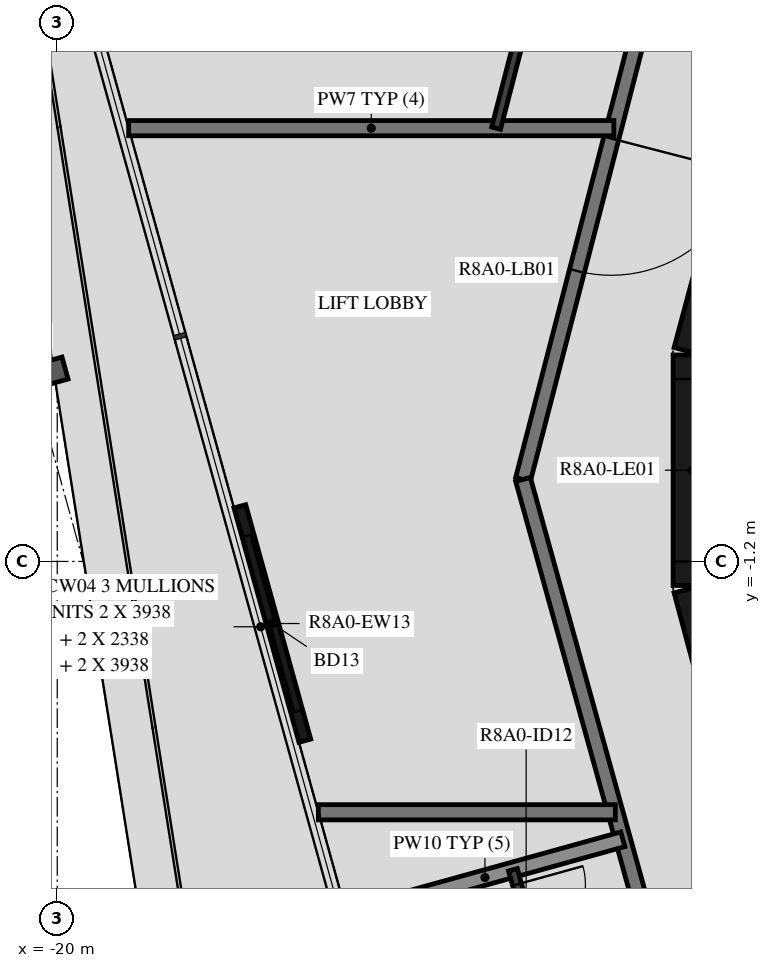
"""IFC4 building model, lengths in metres.
Left out: names, types, materials, properties, quantities, classifications, styles, units other than length and angle.
Written with IfcOpenShell. Run it as: python <this file> out.ifc"""

import sys

from ifc_helpers import new_model, si_unit, direction, frame, frame_2d, origin, origin_2d, place, context, subcontext, project, spatial, rectangle, i_section, extrude, element, fill, save


model = new_model("IFC4")
c1 = context("Model", 3, precision=1e-05, world=origin(), true_north=direction((0.0, 1.0)))
c2 = subcontext(c1, "Body", "Model", "MODEL_VIEW")
j1 = project(units=[si_unit("LENGTHUNIT", "METRE"), si_unit("PLANEANGLEUNIT", "RADIAN")], contexts=[c1])
p1 = place(None, origin())
s1 = spatial("IfcSite", under=j1, at=p1, CompositionType="ELEMENT")
p2 = place(p1, origin())
s2 = spatial("IfcBuilding", under=s1, at=p2, CompositionType="ELEMENT")
p3 = place(p2, frame((0.0, 0.0, 298.2)))
s3 = spatial("IfcBuildingStorey", under=s2, at=p3, CompositionType="ELEMENT", Elevation=298.2)
p4 = place(p3, frame((-20.331, 1.224, -0.45), z_axis=(0.0, 0.0, 1.0), x_axis=(-0.267238143562, 0.963630517691, 0.0)))
e1 = element("IfcColumn", 1, at=p4, inside=s3, PredefinedType="COLUMN", context=c2, shape_type="SweptSolid", body=[
    extrude(i_section(OverallWidth=0.3, OverallDepth=0.9, WebThickness=0.019, FlangeThickness=0.035, FilletRadius=0.03, at=origin_2d()), origin(), (0.0, 0.0, 1.0), 3.57),
])
p5 = place(p3, frame((-17.598, -0.475, 0.0), z_axis=(0.0, 0.0, 1.0), x_axis=(0.267266077957, -0.963622770369, 0.0)))
e2 = element("IfcWall", 2, at=p5, inside=s3, PredefinedType="STANDARD", context=c2, shape_type="SweptSolid", body=[
    extrude(rectangle(XDim=3.2, YDim=0.16, at=frame_2d((1.6, 0.0))), origin(), (0.0, 0.0, 1.0), 3.12),
])
p6 = place(p5, frame((0.4, 0.0, 0.0)))
e3 = element("IfcOpeningElement", 3, at=p6, cuts=e2, PredefinedType="OPENING", context=c2, shape_type="SweptSolid", body=[
    extrude(rectangle(XDim=2.4, YDim=2.4, at=frame_2d((1.2, 1.2))), frame((0.0, 0.09, 0.0), z_axis=(0.0, -1.0, 0.0), x_axis=(1.0, 0.0, 0.0)), (0.0, 0.0, 1.0), 0.18),
])
p7 = place(p3, frame((-10.858, 4.479, 0.0), z_axis=(0.0, 0.0, 1.0), x_axis=(-0.258734743916, -0.965948410781, 0.0)))
e4 = element("IfcWall", 4, at=p7, inside=s3, PredefinedType="SHEAR", context=c2, shape_type="SweptSolid", body=[
    extrude(rectangle(XDim=3.033, YDim=0.5, at=frame_2d((1.516, 0.0))), origin(), (0.0, 0.0, 1.0), 3.12),
])
p8 = place(p3, frame((-11.647, 1.516, 0.0), z_axis=(0.0, 0.0, 1.0), x_axis=(0.0, -1.0, 0.0)))
e5 = element("IfcWall", 5, at=p8, inside=s3, PredefinedType="SHEAR", context=c2, shape_type="SweptSolid", body=[
    extrude(rectangle(XDim=3.033, YDim=0.5, at=frame_2d((1.516, 0.0))), origin(), (0.0, 0.0, 1.0), 3.12),
])
p9 = place(p8, frame((0.316, 0.0, 0.0)))
e6 = element("IfcOpeningElement", 6, at=p9, cuts=e5, PredefinedType="OPENING", context=c2, shape_type="SweptSolid", body=[
    extrude(rectangle(XDim=2.4, YDim=2.1, at=frame_2d((1.2, 1.05))), frame((0.0, 0.26, 0.0), z_axis=(0.0, -1.0, 0.0), x_axis=(1.0, 0.0, 0.0)), (0.0, 0.0, 1.0), 0.52),
])
p10 = place(p3, frame((-11.643, -1.55, 0.0), z_axis=(0.0, 0.0, 1.0), x_axis=(0.258734743916, -0.965948410781, 0.0)))
e7 = element("IfcWall", 7, at=p10, inside=s3, PredefinedType="SHEAR", context=c2, shape_type="SweptSolid", body=[
    extrude(rectangle(XDim=3.033, YDim=0.5, at=frame_2d((1.516, 0.0))), origin(), (0.0, 0.0, 1.0), 3.12),
])
p11 = place(p10, frame((1.066, 0.0, 0.0)))
e8 = element("IfcOpeningElement", 8, at=p11, cuts=e7, PredefinedType="OPENING", context=c2, shape_type="SweptSolid", body=[
    extrude(rectangle(XDim=0.9, YDim=2.1, at=frame_2d((0.45, 1.05))), frame((0.0, 0.26, 0.0), z_axis=(0.0, -1.0, 0.0), x_axis=(1.0, 0.0, 0.0)), (0.0, 0.0, 1.0), 0.52),
])
p12 = place(p3, frame((-12.074, 6.831, 0.0), z_axis=(0.0, 0.0, 1.0), x_axis=(-0.250391063186, -0.968144780225, 0.0)))
e9 = element("IfcWall", 9, at=p12, inside=s3, PredefinedType="STANDARD", context=c2, shape_type="SweptSolid", body=[
    extrude(rectangle(XDim=7.181, YDim=0.2, at=frame_2d((3.591, 0.0))), origin(), (0.0, 0.0, 1.0), 3.12),
])
p13 = place(p12, frame((2.548, 0.0, 0.0)))
e10 = element("IfcOpeningElement", 10, at=p13, cuts=e9, PredefinedType="OPENING", context=c2, shape_type="SweptSolid", body=[
    extrude(rectangle(XDim=1.8, YDim=2.1, at=frame_2d((0.9, 1.05))), frame((0.0, 0.11, 0.0), z_axis=(0.0, -1.0, 0.0), x_axis=(1.0, 0.0, 0.0)), (0.0, 0.0, 1.0), 0.22),
])
p14 = place(p3, frame((-13.872, -0.121, 0.0), z_axis=(0.0, 0.0, 1.0), x_axis=(0.267254575108, -0.963625960674, 0.0)))
e11 = element("IfcWall", 11, at=p14, inside=s3, PredefinedType="STANDARD", context=c2, shape_type="SweptSolid", body=[
    extrude(rectangle(XDim=7.181, YDim=0.2, at=frame_2d((3.591, 0.0))), origin(), (0.0, 0.0, 1.0), 3.12),
])
p15 = place(p3, frame((-12.677, 4.5, 0.0), z_axis=(0.0, 0.0, 1.0), x_axis=(-1.0, 0.0, 0.0)))
e12 = element("IfcWall", 12, at=p15, inside=s3, PredefinedType="STANDARD", context=c2, shape_type="SweptSolid", body=[
    extrude(rectangle(XDim=6.383, YDim=0.2, at=frame_2d((3.192, 0.0))), origin(), (0.0, 0.0, 1.0), 3.12),
])
p16 = place(p3, frame((-16.564, -4.5, 0.0), z_axis=(0.0, 0.0, 1.0), x_axis=(1.0, 0.0, 0.0)))
e13 = element("IfcWall", 13, at=p16, inside=s3, PredefinedType="STANDARD", context=c2, shape_type="SweptSolid", body=[
    extrude(rectangle(XDim=3.907, YDim=0.2, at=frame_2d((1.953, 0.0))), origin(), (0.0, 0.0, 1.0), 3.12),
])
p17 = place(p3, frame((-16.187, -5.862, 0.0), z_axis=(0.0, 0.0, 1.0), x_axis=(0.963631166683, 0.267235803358, 0.0)))
e14 = element("IfcWall", 14, at=p17, inside=s3, PredefinedType="STANDARD", context=c2, shape_type="SweptSolid", body=[
    extrude(rectangle(XDim=3.765, YDim=0.2, at=frame_2d((1.882, 0.0))), origin(), (0.0, 0.0, 1.0), 2.73),
])
p18 = place(p3, frame((-13.701, 6.533, 0.0), z_axis=(0.0, 0.0, 1.0), x_axis=(-0.250352755349, -0.968154686963, 0.0)))
e15 = element("IfcWall", 15, at=p18, inside=s3, PredefinedType="PARTITIONING", context=c2, shape_type="SweptSolid", body=[
    extrude(rectangle(XDim=2.1, YDim=0.12, at=frame_2d((1.05, 0.0))), origin(), (0.0, 0.0, 1.0), 3.12),
])
p19 = place(p3, frame((-14.005, -5.256, 0.0), z_axis=(0.0, 0.0, 1.0), x_axis=(0.267200500487, -0.963640956238, 0.0)))
e16 = element("IfcWall", 16, at=p19, inside=s3, PredefinedType="PARTITIONING", context=c2, shape_type="SweptSolid", body=[
    extrude(rectangle(XDim=2.67, YDim=0.12, at=frame_2d((1.335, 0.0))), origin(), (0.0, 0.0, 1.0), 3.12),
])
p20 = place(p19, frame((0.2, 0.0, 0.0)))
e17 = element("IfcOpeningElement", 17, at=p20, cuts=e16, PredefinedType="OPENING", context=c2, shape_type="SweptSolid", body=[
    extrude(rectangle(XDim=0.9, YDim=2.1, at=frame_2d((0.45, 1.05))), frame((0.0, 0.07, 0.0), z_axis=(0.0, -1.0, 0.0), x_axis=(1.0, 0.0, 0.0)), (0.0, 0.0, 1.0), 0.14),
])
p21 = place(p6, origin())
e18 = element("IfcDoor", 18, at=p21, inside=s3, OperationType="DOUBLE_DOOR_SLIDING", PredefinedType="DOOR", context=c2, shape_type="SweptSolid", body=[
    extrude(rectangle(XDim=2.4, YDim=2.4, at=frame_2d((1.2, 1.2))), frame((0.0, 0.025, 0.0), z_axis=(0.0, -1.0, 0.0), x_axis=(1.0, 0.0, 0.0)), (0.0, 0.0, 1.0), 0.05),
])
fill(e3, e18)
p22 = place(p9, origin())
e19 = element("IfcDoor", 19, at=p22, inside=s3, OperationType="DOUBLE_DOOR_SINGLE_SWING", PredefinedType="DOOR", context=c2, shape_type="SweptSolid", body=[
    extrude(rectangle(XDim=2.4, YDim=2.1, at=frame_2d((1.2, 1.05))), frame((0.0, 0.025, 0.0), z_axis=(0.0, -1.0, 0.0), x_axis=(1.0, 0.0, 0.0)), (0.0, 0.0, 1.0), 0.05),
])
fill(e6, e19)
p23 = place(p20, origin())
e20 = element("IfcDoor", 20, at=p23, inside=s3, OperationType="SINGLE_SWING_RIGHT", PredefinedType="DOOR", context=c2, shape_type="SweptSolid", body=[
    extrude(rectangle(XDim=0.9, YDim=2.1, at=frame_2d((0.45, 1.05))), frame((0.0, 0.025, 0.0), z_axis=(0.0, -1.0, 0.0), x_axis=(1.0, 0.0, 0.0)), (0.0, 0.0, 1.0), 0.05),
])
fill(e17, e20)
p24 = place(p13, origin())
e21 = element("IfcDoor", 21, at=p24, inside=s3, OperationType="DOUBLE_DOOR_SINGLE_SWING", PredefinedType="DOOR", context=c2, shape_type="SweptSolid", body=[
    extrude(rectangle(XDim=1.8, YDim=2.1, at=frame_2d((0.9, 1.05))), frame((0.0, 0.025, 0.0), z_axis=(0.0, -1.0, 0.0), x_axis=(1.0, 0.0, 0.0)), (0.0, 0.0, 1.0), 0.05),
])
fill(e10, e21)
save(model, sys.argv[1])
